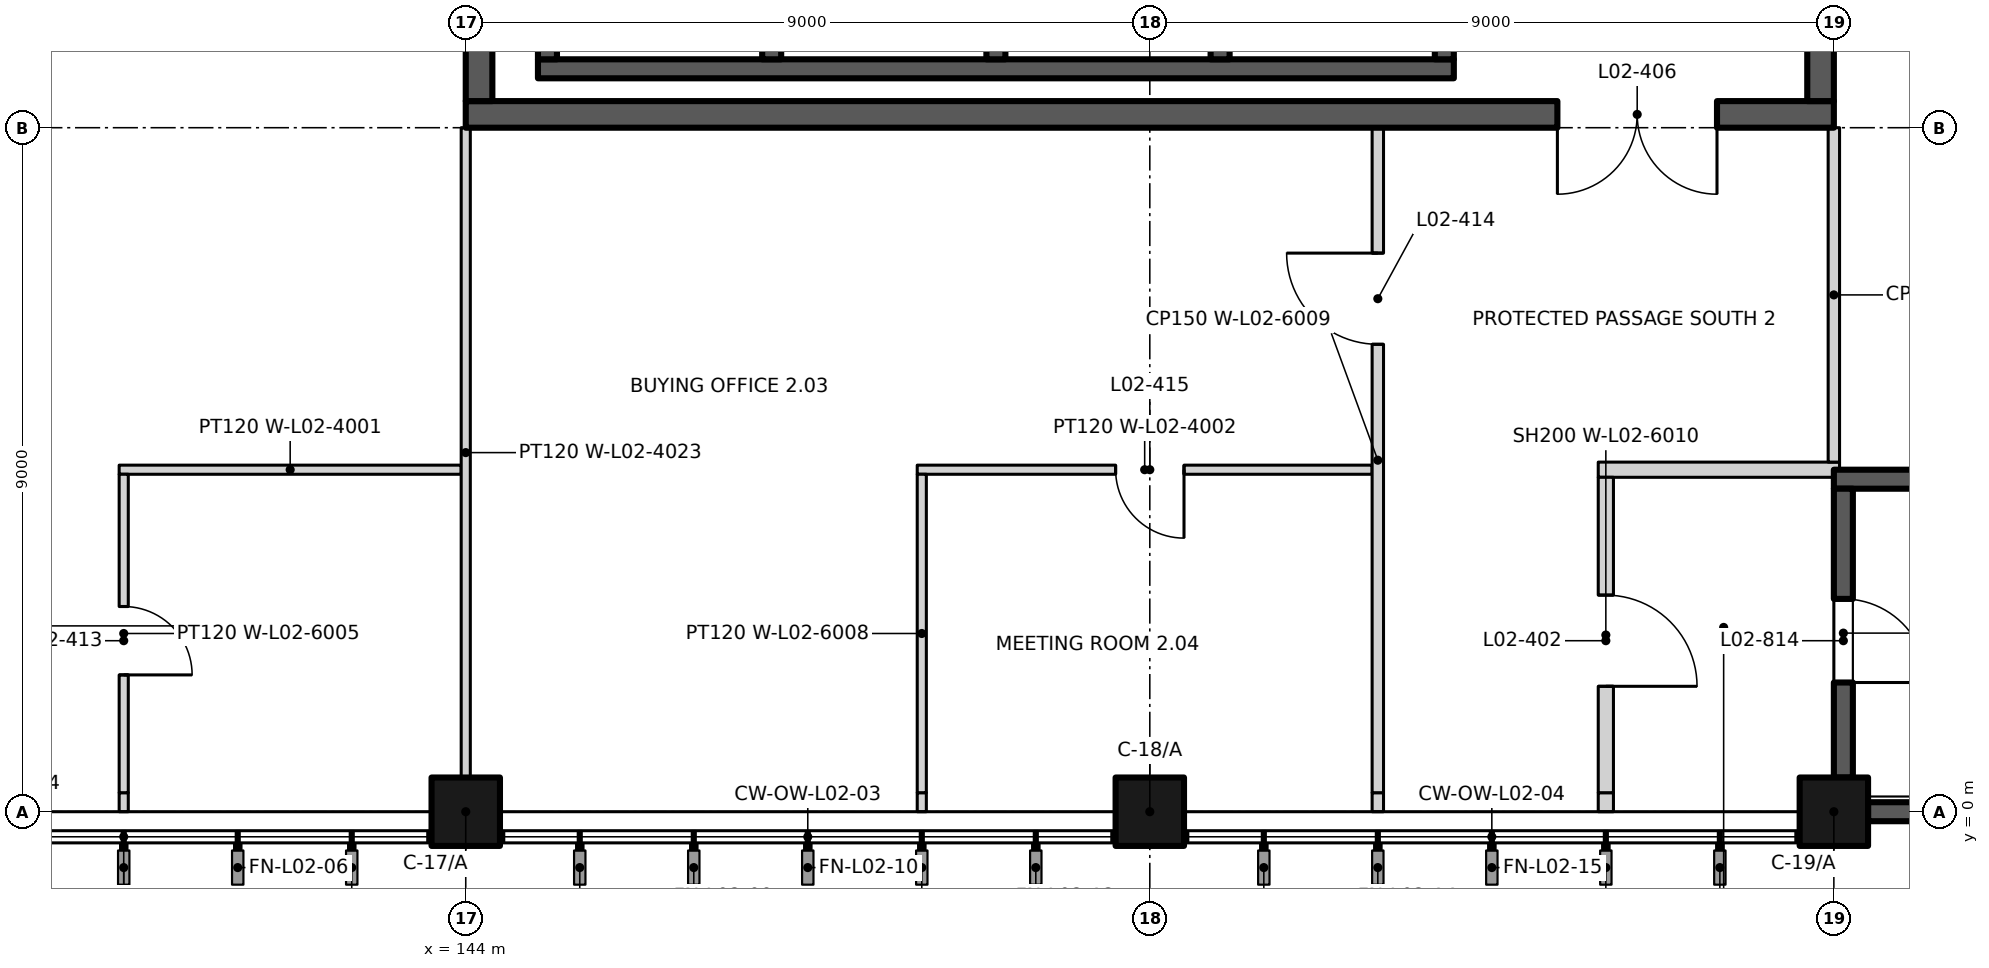
"""IFC4 building model, lengths in metres.
Left out: names, types, materials, properties, quantities, classifications, styles, units other than length and angle.
Written with IfcOpenShell. Run it as: python <this file> out.ifc"""

import sys

from ifc_helpers import new_model, si_unit, direction, frame, frame_2d, origin, origin_2d, place, context, subcontext, project, spatial, rectangle, extrude, element, fill, save


model = new_model("IFC4")
c1 = context("Model", 3, precision=1e-05, world=origin(), true_north=direction((0.0, 1.0)))
c2 = subcontext(c1, "Body", "Model", "MODEL_VIEW")
j1 = project(units=[si_unit("LENGTHUNIT", "METRE"), si_unit("PLANEANGLEUNIT", "RADIAN")], contexts=[c1])
p1 = place(None, origin())
s1 = spatial("IfcSite", under=j1, at=p1, CompositionType="ELEMENT")
p2 = place(p1, origin())
s2 = spatial("IfcBuilding", under=s1, at=p2, CompositionType="ELEMENT")
p3 = place(p2, frame((0.0, 0.0, 10.5)))
s3 = spatial("IfcBuildingStorey", under=s2, at=p3, CompositionType="ELEMENT", Elevation=10.5)
for number, where, z_axis, x_axis in (
    (1, (144.0, 0.0, 0.0), (0.0, 0.0, 1.0), (1.0, 0.0, 0.0)),
    (2, (153.0, 0.0, 0.0), (0.0, 0.0, 1.0), (1.0, 0.0, 0.0)),
    (3, (162.0, 0.0, 0.0), (0.0, 0.0, 1.0), (1.0, 0.0, 0.0)),
):
    element("IfcColumn", number, at=place(p3, frame(where, z_axis=z_axis, x_axis=x_axis)), inside=s3, PredefinedType="COLUMN", context=c2, shape_type="SweptSolid", body=[
        extrude(rectangle(XDim=0.9, YDim=0.9, at=origin_2d()), origin(), (0.0, 0.0, 1.0), 4.5),
    ])
p4 = place(p3, frame((162.45, 0.0, 0.0), z_axis=(0.0, 0.0, 1.0), x_axis=(1.0, 0.0, 0.0)))
e4 = element("IfcWall", 4, at=p4, inside=s3, PredefinedType="SHEAR", context=c2, shape_type="SweptSolid", body=[
    extrude(rectangle(XDim=8.1, YDim=0.25, at=frame_2d((4.05, 0.0))), origin(), (0.0, 0.0, 1.0), 4.5),
])
p5 = place(p3, frame((162.0, 4.375, 0.0), z_axis=(0.0, 0.0, 1.0), x_axis=(1.0, 0.0, 0.0)))
e5 = element("IfcWall", 5, at=p5, inside=s3, PredefinedType="SHEAR", context=c2, shape_type="SweptSolid", body=[
    extrude(rectangle(XDim=9.0, YDim=0.25, at=frame_2d((4.5, 0.0))), origin(), (0.0, 0.0, 1.0), 4.5),
])
p6 = place(p3, frame((162.125, 0.45, 0.0), z_axis=(0.0, 0.0, 1.0), x_axis=(0.0, 1.0, 0.0)))
e6 = element("IfcWall", 6, at=p6, inside=s3, PredefinedType="SHEAR", context=c2, shape_type="SweptSolid", body=[
    extrude(rectangle(XDim=3.8, YDim=0.25, at=frame_2d((1.9, 0.0))), origin(), (0.0, 0.0, 1.0), 4.5),
])
p7 = place(p6, frame((2.35, 0.0, 0.0), z_axis=(0.0, 0.0, 1.0), x_axis=(-1.0, 0.0, 0.0)))
e7 = element("IfcOpeningElement", 7, at=p7, cuts=e6, PredefinedType="OPENING", context=c2, shape_type="SweptSolid", body=[
    extrude(rectangle(XDim=1.1, YDim=2.1, at=frame_2d((0.55, 1.05))), frame((0.0, 0.135, 0.0), z_axis=(0.0, -1.0, 0.0), x_axis=(1.0, 0.0, 0.0)), (0.0, 0.0, 1.0), 0.27),
])
p8 = place(p3, frame((144.95, 9.775, 0.0), z_axis=(0.0, 0.0, 1.0), x_axis=(1.0, 0.0, 0.0)))
e8 = element("IfcWall", 8, at=p8, inside=s3, PredefinedType="SHEAR", context=c2, shape_type="SweptSolid", body=[
    extrude(rectangle(XDim=12.05, YDim=0.25, at=frame_2d((6.025, 0.0))), origin(), (0.0, 0.0, 1.0), 4.5),
])
for number, where, z_axis, x_axis in (
    (9, (145.075, 9.9, 0.0), (0.0, 0.0, 1.0), (0.0, 1.0, 0.0)),
    (10, (148.025, 9.9, 0.0), (0.0, 0.0, 1.0), (0.0, 1.0, 0.0)),
    (11, (150.975, 9.9, 0.0), (0.0, 0.0, 1.0), (0.0, 1.0, 0.0)),
    (12, (153.925, 9.9, 0.0), (0.0, 0.0, 1.0), (0.0, 1.0, 0.0)),
    (13, (156.875, 9.9, 0.0), (0.0, 0.0, 1.0), (0.0, 1.0, 0.0)),
):
    element("IfcWall", number, at=place(p3, frame(where, z_axis=z_axis, x_axis=x_axis)), inside=s3, PredefinedType="SHEAR", context=c2, shape_type="SweptSolid", body=[
        extrude(rectangle(XDim=2.7, YDim=0.25, at=frame_2d((1.35, 0.0))), origin(), (0.0, 0.0, 1.0), 4.5),
    ])
p9 = place(p3, frame((139.44, 4.5, 0.0), z_axis=(0.0, 0.0, 1.0), x_axis=(1.0, 0.0, 0.0)))
e14 = element("IfcWall", 14, at=p9, inside=s3, PredefinedType="PARTITIONING", context=c2, shape_type="SweptSolid", body=[
    extrude(rectangle(XDim=4.5, YDim=0.12, at=frame_2d((2.25, 0.0))), origin(), (0.0, 0.0, 1.0), 4.2),
])
p10 = place(p3, frame((149.94, 4.5, 0.0), z_axis=(0.0, 0.0, 1.0), x_axis=(1.0, 0.0, 0.0)))
e15 = element("IfcWall", 15, at=p10, inside=s3, PredefinedType="PARTITIONING", context=c2, shape_type="SweptSolid", body=[
    extrude(rectangle(XDim=5.985, YDim=0.12, at=frame_2d((2.993, 0.0))), origin(), (0.0, 0.0, 1.0), 4.2),
])
p11 = place(p10, frame((3.51, 0.0, 0.0), z_axis=(0.0, 0.0, 1.0), x_axis=(-1.0, 0.0, 0.0)))
e16 = element("IfcOpeningElement", 16, at=p11, cuts=e15, PredefinedType="OPENING", context=c2, shape_type="SweptSolid", body=[
    extrude(rectangle(XDim=0.9, YDim=2.1, at=frame_2d((0.45, 1.05))), frame((0.0, 0.07, 0.0), z_axis=(0.0, -1.0, 0.0), x_axis=(1.0, 0.0, 0.0)), (0.0, 0.0, 1.0), 0.14),
])
p12 = place(p3, frame((158.9, 4.5, 0.0), z_axis=(0.0, 0.0, 1.0), x_axis=(1.0, 0.0, 0.0)))
e17 = element("IfcWall", 17, at=p12, inside=s3, PredefinedType="PARTITIONING", context=c2, shape_type="SweptSolid", body=[
    extrude(rectangle(XDim=3.175, YDim=0.2, at=frame_2d((1.587, 0.0))), origin(), (0.0, 0.0, 1.0), 4.2),
])
p13 = place(p3, frame((144.0, 9.175, 0.0), z_axis=(0.0, 0.0, 1.0), x_axis=(1.0, 0.0, 0.0)))
e18 = element("IfcWall", 18, at=p13, inside=s3, PredefinedType="SHEAR", context=c2, shape_type="SweptSolid", body=[
    extrude(rectangle(XDim=18.0, YDim=0.35, at=frame_2d((9.0, 0.0))), origin(), (0.0, 0.0, 1.0), 4.2),
])
p14 = place(p13, frame((16.463, 0.0, 0.0), z_axis=(0.0, 0.0, 1.0), x_axis=(-1.0, 0.0, 0.0)))
e19 = element("IfcOpeningElement", 19, at=p14, cuts=e18, PredefinedType="OPENING", context=c2, shape_type="SweptSolid", body=[
    extrude(rectangle(XDim=2.1, YDim=2.4, at=frame_2d((1.05, 1.2))), frame((0.0, 0.185, 0.0), z_axis=(0.0, -1.0, 0.0), x_axis=(1.0, 0.0, 0.0)), (0.0, 0.0, 1.0), 0.37),
])
p15 = place(p3, frame((139.5, 0.0, 0.0), z_axis=(0.0, 0.0, 1.0), x_axis=(0.0, 1.0, 0.0)))
e20 = element("IfcWall", 20, at=p15, inside=s3, PredefinedType="PARTITIONING", context=c2, shape_type="SweptSolid", body=[
    extrude(rectangle(XDim=0.25, YDim=0.12, at=frame_2d((0.125, 0.0))), origin(), (0.0, 0.0, 1.0), 3.6),
])
p16 = place(p3, frame((139.5, 0.25, 0.0), z_axis=(0.0, 0.0, 1.0), x_axis=(0.0, 1.0, 0.0)))
e21 = element("IfcWall", 21, at=p16, inside=s3, PredefinedType="PARTITIONING", context=c2, shape_type="SweptSolid", body=[
    extrude(rectangle(XDim=4.19, YDim=0.12, at=frame_2d((2.095, 0.0))), origin(), (0.0, 0.0, 1.0), 4.2),
])
p17 = place(p16, frame((2.45, 0.0, 0.0), z_axis=(0.0, 0.0, 1.0), x_axis=(-1.0, 0.0, 0.0)))
e22 = element("IfcOpeningElement", 22, at=p17, cuts=e21, PredefinedType="OPENING", context=c2, shape_type="SweptSolid", body=[
    extrude(rectangle(XDim=0.9, YDim=2.1, at=frame_2d((0.45, 1.05))), frame((0.0, 0.07, 0.0), z_axis=(0.0, -1.0, 0.0), x_axis=(1.0, 0.0, 0.0)), (0.0, 0.0, 1.0), 0.14),
])
p18 = place(p3, frame((144.0, 0.45, 0.0), z_axis=(0.0, 0.0, 1.0), x_axis=(0.0, 1.0, 0.0)))
e23 = element("IfcWall", 23, at=p18, inside=s3, PredefinedType="PARTITIONING", context=c2, shape_type="SweptSolid", body=[
    extrude(rectangle(XDim=8.55, YDim=0.12, at=frame_2d((4.275, 0.0))), origin(), (0.0, 0.0, 1.0), 4.2),
])
p19 = place(p3, frame((144.175, 9.35, 0.0), z_axis=(0.0, 0.0, 1.0), x_axis=(0.0, 1.0, 0.0)))
e24 = element("IfcWall", 24, at=p19, inside=s3, PredefinedType="SHEAR", context=c2, shape_type="SweptSolid", body=[
    extrude(rectangle(XDim=17.4, YDim=0.35, at=frame_2d((8.7, 0.0))), origin(), (0.0, 0.0, 1.0), 4.2),
])
p20 = place(p19, frame((3.75, 0.0, 0.0)))
e25 = element("IfcOpeningElement", 25, at=p20, cuts=e24, PredefinedType="OPENING", context=c2, shape_type="SweptSolid", body=[
    extrude(rectangle(XDim=1.6, YDim=2.4, at=frame_2d((0.8, 1.2))), frame((0.0, 0.185, 0.0), z_axis=(0.0, -1.0, 0.0), x_axis=(1.0, 0.0, 0.0)), (0.0, 0.0, 1.0), 0.37),
])
p21 = place(p3, frame((150.0, 0.0, 0.0), z_axis=(0.0, 0.0, 1.0), x_axis=(0.0, 1.0, 0.0)))
e26 = element("IfcWall", 26, at=p21, inside=s3, PredefinedType="PARTITIONING", context=c2, shape_type="SweptSolid", body=[
    extrude(rectangle(XDim=0.25, YDim=0.12, at=frame_2d((0.125, 0.0))), origin(), (0.0, 0.0, 1.0), 3.6),
])
p22 = place(p3, frame((150.0, 0.25, 0.0), z_axis=(0.0, 0.0, 1.0), x_axis=(0.0, 1.0, 0.0)))
e27 = element("IfcWall", 27, at=p22, inside=s3, PredefinedType="PARTITIONING", context=c2, shape_type="SweptSolid", body=[
    extrude(rectangle(XDim=4.19, YDim=0.12, at=frame_2d((2.095, 0.0))), origin(), (0.0, 0.0, 1.0), 4.2),
])
p23 = place(p3, frame((156.0, 0.0, 0.0), z_axis=(0.0, 0.0, 1.0), x_axis=(0.0, 1.0, 0.0)))
e28 = element("IfcWall", 28, at=p23, inside=s3, PredefinedType="PARTITIONING", context=c2, shape_type="SweptSolid", body=[
    extrude(rectangle(XDim=0.25, YDim=0.15, at=frame_2d((0.125, 0.0))), origin(), (0.0, 0.0, 1.0), 3.6),
])
p24 = place(p3, frame((156.0, 0.25, 0.0), z_axis=(0.0, 0.0, 1.0), x_axis=(0.0, 1.0, 0.0)))
e29 = element("IfcWall", 29, at=p24, inside=s3, PredefinedType="PARTITIONING", context=c2, shape_type="SweptSolid", body=[
    extrude(rectangle(XDim=8.75, YDim=0.15, at=frame_2d((4.375, 0.0))), origin(), (0.0, 0.0, 1.0), 4.2),
])
p25 = place(p24, frame((5.9, 0.0, 0.0)))
e30 = element("IfcOpeningElement", 30, at=p25, cuts=e29, PredefinedType="OPENING", context=c2, shape_type="SweptSolid", body=[
    extrude(rectangle(XDim=1.2, YDim=2.1, at=frame_2d((0.6, 1.05))), frame((0.0, 0.085, 0.0), z_axis=(0.0, -1.0, 0.0), x_axis=(1.0, 0.0, 0.0)), (0.0, 0.0, 1.0), 0.17),
])
p26 = place(p3, frame((159.0, 0.0, 0.0), z_axis=(0.0, 0.0, 1.0), x_axis=(0.0, 1.0, 0.0)))
e31 = element("IfcWall", 31, at=p26, inside=s3, PredefinedType="PARTITIONING", context=c2, shape_type="SweptSolid", body=[
    extrude(rectangle(XDim=0.25, YDim=0.2, at=frame_2d((0.125, 0.0))), origin(), (0.0, 0.0, 1.0), 3.6),
])
p27 = place(p3, frame((159.0, 0.25, 0.0), z_axis=(0.0, 0.0, 1.0), x_axis=(0.0, 1.0, 0.0)))
e32 = element("IfcWall", 32, at=p27, inside=s3, PredefinedType="PARTITIONING", context=c2, shape_type="SweptSolid", body=[
    extrude(rectangle(XDim=4.15, YDim=0.2, at=frame_2d((2.075, 0.0))), origin(), (0.0, 0.0, 1.0), 4.2),
])
p28 = place(p27, frame((2.6, 0.0, 0.0), z_axis=(0.0, 0.0, 1.0), x_axis=(-1.0, 0.0, 0.0)))
e33 = element("IfcOpeningElement", 33, at=p28, cuts=e32, PredefinedType="OPENING", context=c2, shape_type="SweptSolid", body=[
    extrude(rectangle(XDim=1.2, YDim=2.1, at=frame_2d((0.6, 1.05))), frame((0.0, 0.11, 0.0), z_axis=(0.0, -1.0, 0.0), x_axis=(1.0, 0.0, 0.0)), (0.0, 0.0, 1.0), 0.22),
])
p29 = place(p3, frame((161.825, 9.35, 0.0), z_axis=(0.0, 0.0, 1.0), x_axis=(0.0, 1.0, 0.0)))
e34 = element("IfcWall", 34, at=p29, inside=s3, PredefinedType="SHEAR", context=c2, shape_type="SweptSolid", body=[
    extrude(rectangle(XDim=17.4, YDim=0.35, at=frame_2d((8.7, 0.0))), origin(), (0.0, 0.0, 1.0), 4.2),
])
p30 = place(p29, frame((7.3, 0.0, 0.0), z_axis=(0.0, 0.0, 1.0), x_axis=(-1.0, 0.0, 0.0)))
e35 = element("IfcOpeningElement", 35, at=p30, cuts=e34, PredefinedType="OPENING", context=c2, shape_type="SweptSolid", body=[
    extrude(rectangle(XDim=1.8, YDim=2.4, at=frame_2d((0.9, 1.2))), frame((0.0, 0.185, 0.0), z_axis=(0.0, -1.0, 0.0), x_axis=(1.0, 0.0, 0.0)), (0.0, 0.0, 1.0), 0.37),
])
p31 = place(p3, frame((162.0, 4.6, 0.0), z_axis=(0.0, 0.0, 1.0), x_axis=(0.0, 1.0, 0.0)))
e36 = element("IfcWall", 36, at=p31, inside=s3, PredefinedType="PARTITIONING", context=c2, shape_type="SweptSolid", body=[
    extrude(rectangle(XDim=4.4, YDim=0.15, at=frame_2d((2.2, 0.0))), origin(), (0.0, 0.0, 1.0), 4.2),
])
p32 = place(p7, origin())
e37 = element("IfcDoor", 37, at=p32, inside=s3, OperationType="SINGLE_SWING_RIGHT", PredefinedType="DOOR", context=c2, shape_type="SweptSolid", body=[
    extrude(rectangle(XDim=1.1, YDim=2.1, at=frame_2d((0.55, 1.05))), frame((0.0, 0.025, 0.0), z_axis=(0.0, -1.0, 0.0), x_axis=(1.0, 0.0, 0.0)), (0.0, 0.0, 1.0), 0.05),
])
fill(e7, e37)
p33 = place(p28, origin())
e38 = element("IfcDoor", 38, at=p33, inside=s3, OperationType="SINGLE_SWING_RIGHT", PredefinedType="DOOR", context=c2, shape_type="SweptSolid", body=[
    extrude(rectangle(XDim=1.2, YDim=2.1, at=frame_2d((0.6, 1.05))), frame((0.0, 0.025, 0.0), z_axis=(0.0, -1.0, 0.0), x_axis=(1.0, 0.0, 0.0)), (0.0, 0.0, 1.0), 0.05),
])
fill(e33, e38)
p34 = place(p14, origin())
e39 = element("IfcDoor", 39, at=p34, inside=s3, OperationType="DOUBLE_DOOR_SINGLE_SWING", PredefinedType="DOOR", context=c2, shape_type="SweptSolid", body=[
    extrude(rectangle(XDim=2.1, YDim=2.4, at=frame_2d((1.05, 1.2))), frame((0.0, 0.025, 0.0), z_axis=(0.0, -1.0, 0.0), x_axis=(1.0, 0.0, 0.0)), (0.0, 0.0, 1.0), 0.05),
])
fill(e19, e39)
p35 = place(p17, origin())
e40 = element("IfcDoor", 40, at=p35, inside=s3, OperationType="SINGLE_SWING_RIGHT", PredefinedType="DOOR", context=c2, shape_type="SweptSolid", body=[
    extrude(rectangle(XDim=0.9, YDim=2.1, at=frame_2d((0.45, 1.05))), frame((0.0, 0.025, 0.0), z_axis=(0.0, -1.0, 0.0), x_axis=(1.0, 0.0, 0.0)), (0.0, 0.0, 1.0), 0.05),
])
fill(e22, e40)
p36 = place(p25, origin())
e41 = element("IfcDoor", 41, at=p36, inside=s3, OperationType="SINGLE_SWING_RIGHT", PredefinedType="DOOR", context=c2, shape_type="SweptSolid", body=[
    extrude(rectangle(XDim=1.2, YDim=2.1, at=frame_2d((0.6, 1.05))), frame((0.0, 0.025, 0.0), z_axis=(0.0, -1.0, 0.0), x_axis=(1.0, 0.0, 0.0)), (0.0, 0.0, 1.0), 0.05),
])
fill(e30, e41)
p37 = place(p11, origin())
e42 = element("IfcDoor", 42, at=p37, inside=s3, OperationType="SINGLE_SWING_LEFT", PredefinedType="DOOR", context=c2, shape_type="SweptSolid", body=[
    extrude(rectangle(XDim=0.9, YDim=2.1, at=frame_2d((0.45, 1.05))), frame((0.0, 0.025, 0.0), z_axis=(0.0, -1.0, 0.0), x_axis=(1.0, 0.0, 0.0)), (0.0, 0.0, 1.0), 0.05),
])
fill(e16, e42)
save(model, sys.argv[1])
